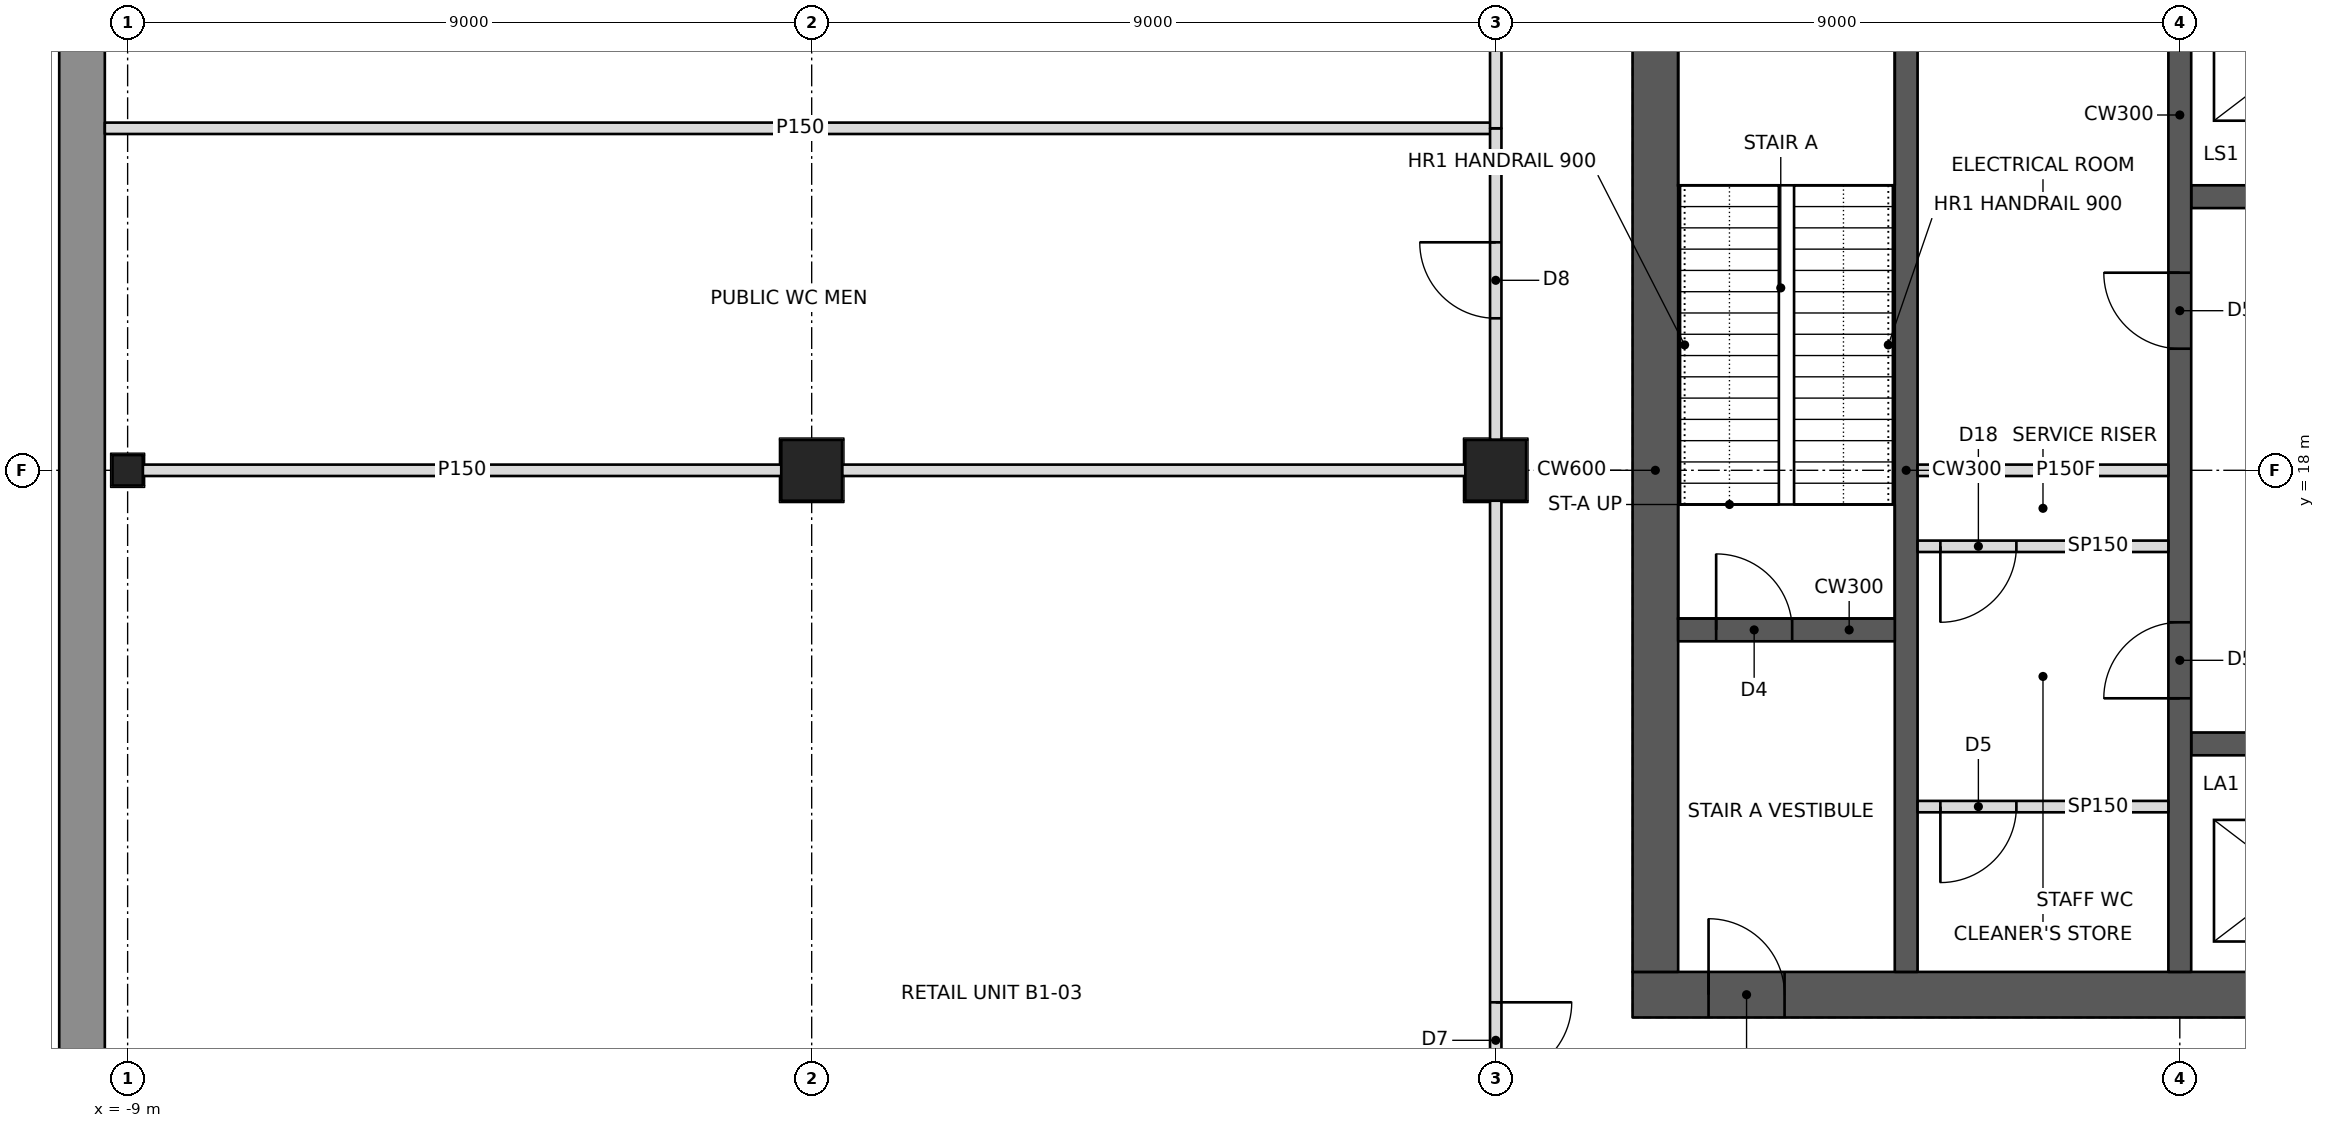
"""IFC4 building model, lengths in metres.
Left out: names, types, materials, properties, quantities, classifications, styles, units other than length and angle.
Written with IfcOpenShell. Run it as: python <this file> out.ifc"""

import sys

from ifc_helpers import new_model, si_unit, direction, frame, frame_2d, origin, origin_2d, place, context, subcontext, project, spatial, rectangle, hollow_rectangle, i_section, extrude, element, fill, save


model = new_model("IFC4")
c1 = context("Model", 3, precision=1e-05, world=origin(), true_north=direction((0.0, 1.0)))
c2 = subcontext(c1, "Body", "Model", "MODEL_VIEW")
j1 = project(units=[si_unit("LENGTHUNIT", "METRE"), si_unit("PLANEANGLEUNIT", "RADIAN")], contexts=[c1])
p1 = place(None, origin())
s1 = spatial("IfcSite", under=j1, at=p1, CompositionType="ELEMENT")
p2 = place(p1, origin())
s2 = spatial("IfcBuilding", under=s1, at=p2, CompositionType="ELEMENT")
p3 = place(p2, frame((0.0, 0.0, -5.5)))
s3 = spatial("IfcBuildingStorey", under=s2, at=p3, CompositionType="ELEMENT", Elevation=-5.5)
p4 = place(p3, frame((-9.0, 18.0, 0.0), z_axis=(0.0, 0.0, 1.0), x_axis=(0.0, 1.0, 0.0)))
e1 = element("IfcColumn", 1, at=p4, inside=s3, PredefinedType="COLUMN", context=c2, shape_type="SweptSolid", body=[
    extrude(i_section(OverallWidth=0.401, OverallDepth=0.399, WebThickness=0.025, FlangeThickness=0.04, at=origin_2d()), origin(), (0.0, 0.0, 1.0), 5.5),
])
for number, where, z_axis, x_axis in (
    (2, (0.0, 18.0, 0.0), (0.0, 0.0, 1.0), (0.0, 1.0, 0.0)),
    (3, (9.0, 18.0, 0.0), (0.0, 0.0, 1.0), (1.0, 0.0, 0.0)),
):
    element("IfcColumn", number, at=place(p3, frame(where, z_axis=z_axis, x_axis=x_axis)), inside=s3, PredefinedType="COLUMN", context=c2, shape_type="SweptSolid", body=[
        extrude(hollow_rectangle(XDim=0.8, YDim=0.8, WallThickness=0.1, at=origin_2d()), origin(), (0.0, 0.0, 1.0), 5.5),
    ])
p5 = place(p3, frame((10.8, 11.1, 0.0), z_axis=(0.0, 0.0, 1.0), x_axis=(1.0, 0.0, 0.0)))
e4 = element("IfcWall", 4, at=p5, inside=s3, PredefinedType="SHEAR", context=c2, shape_type="SweptSolid", body=[
    extrude(rectangle(XDim=23.4, YDim=0.6, at=frame_2d((11.7, 0.0))), origin(), (0.0, 0.0, 1.0), 5.5),
])
p6 = place(p5, frame((1.0, 0.0, 0.0)))
e5 = element("IfcOpeningElement", 5, at=p6, cuts=e4, PredefinedType="OPENING", context=c2, shape_type="SweptSolid", body=[
    extrude(rectangle(XDim=1.0, YDim=2.1, at=frame_2d((0.5, 1.05))), frame((0.0, 0.31, 0.0), z_axis=(0.0, -1.0, 0.0), x_axis=(1.0, 0.0, 0.0)), (0.0, 0.0, 1.0), 0.62),
])
p7 = place(p5, frame((17.2, 0.0, 0.0)))
e6 = element("IfcOpeningElement", 6, at=p7, cuts=e4, PredefinedType="OPENING", context=c2, shape_type="SweptSolid", body=[
    extrude(rectangle(XDim=1.8, YDim=2.1, at=frame_2d((0.9, 1.05))), frame((0.0, 0.31, 0.0), z_axis=(0.0, -1.0, 0.0), x_axis=(1.0, 0.0, 0.0)), (0.0, 0.0, 1.0), 0.62),
])
p8 = place(p3, frame((11.1, 11.4, 0.0), z_axis=(0.0, 0.0, 1.0), x_axis=(0.0, 1.0, 0.0)))
e7 = element("IfcWall", 7, at=p8, inside=s3, PredefinedType="SHEAR", context=c2, shape_type="SweptSolid", body=[
    extrude(rectangle(XDim=13.2, YDim=0.6, at=frame_2d((6.6, 0.0))), origin(), (0.0, 0.0, 1.0), 5.5),
])
p9 = place(p3, frame((14.4, 11.4, 0.0), z_axis=(0.0, 0.0, 1.0), x_axis=(0.0, 1.0, 0.0)))
e8 = element("IfcWall", 8, at=p9, inside=s3, PredefinedType="SHEAR", context=c2, shape_type="SweptSolid", body=[
    extrude(rectangle(XDim=13.2, YDim=0.3, at=frame_2d((6.6, 0.0))), origin(), (0.0, 0.0, 1.0), 5.5),
])
p10 = place(p3, frame((11.4, 15.9, 0.0), z_axis=(0.0, 0.0, 1.0), x_axis=(1.0, 0.0, 0.0)))
e9 = element("IfcWall", 9, at=p10, inside=s3, PredefinedType="SHEAR", context=c2, shape_type="SweptSolid", body=[
    extrude(rectangle(XDim=2.85, YDim=0.3, at=frame_2d((1.425, 0.0))), origin(), (0.0, 0.0, 1.0), 5.5),
])
p11 = place(p10, frame((0.5, 0.0, 0.0)))
e10 = element("IfcOpeningElement", 10, at=p11, cuts=e9, PredefinedType="OPENING", context=c2, shape_type="SweptSolid", body=[
    extrude(rectangle(XDim=1.0, YDim=2.1, at=frame_2d((0.5, 1.05))), frame((0.0, 0.16, 0.0), z_axis=(0.0, -1.0, 0.0), x_axis=(1.0, 0.0, 0.0)), (0.0, 0.0, 1.0), 0.32),
])
p12 = place(p3, frame((18.0, 11.4, 0.0), z_axis=(0.0, 0.0, 1.0), x_axis=(0.0, 1.0, 0.0)))
e11 = element("IfcWall", 11, at=p12, inside=s3, PredefinedType="SHEAR", context=c2, shape_type="SweptSolid", body=[
    extrude(rectangle(XDim=13.2, YDim=0.3, at=frame_2d((6.6, 0.0))), origin(), (0.0, 0.0, 1.0), 5.5),
])
p13 = place(p12, frame((3.6, 0.0, 0.0)))
e12 = element("IfcOpeningElement", 12, at=p13, cuts=e11, PredefinedType="OPENING", context=c2, shape_type="SweptSolid", body=[
    extrude(rectangle(XDim=1.0, YDim=2.1, at=frame_2d((0.5, 1.05))), frame((0.0, 0.16, 0.0), z_axis=(0.0, -1.0, 0.0), x_axis=(1.0, 0.0, 0.0)), (0.0, 0.0, 1.0), 0.32),
])
p14 = place(p12, frame((8.2, 0.0, 0.0)))
e13 = element("IfcOpeningElement", 13, at=p14, cuts=e11, PredefinedType="OPENING", context=c2, shape_type="SweptSolid", body=[
    extrude(rectangle(XDim=1.0, YDim=2.1, at=frame_2d((0.5, 1.05))), frame((0.0, 0.16, 0.0), z_axis=(0.0, -1.0, 0.0), x_axis=(1.0, 0.0, 0.0)), (0.0, 0.0, 1.0), 0.32),
])
p15 = place(p3, frame((14.55, 18.0, 0.0), z_axis=(0.0, 0.0, 1.0), x_axis=(1.0, 0.0, 0.0)))
e14 = element("IfcWall", 14, at=p15, inside=s3, PredefinedType="PARTITIONING", context=c2, shape_type="SweptSolid", body=[
    extrude(rectangle(XDim=3.3, YDim=0.15, at=frame_2d((1.65, 0.0))), origin(), (0.0, 0.0, 1.0), 5.2),
])
p16 = place(p3, frame((18.15, 14.4, 0.0), z_axis=(0.0, 0.0, 1.0), x_axis=(1.0, 0.0, 0.0)))
e15 = element("IfcWall", 15, at=p16, inside=s3, PredefinedType="SHEAR", context=c2, shape_type="SweptSolid", body=[
    extrude(rectangle(XDim=9.0, YDim=0.3, at=frame_2d((4.5, 0.0))), origin(), (0.0, 0.0, 1.0), 5.5),
])
p17 = place(p16, frame((6.75, 0.0, 0.0)))
e16 = element("IfcOpeningElement", 16, at=p17, cuts=e15, PredefinedType="OPENING", context=c2, shape_type="SweptSolid", body=[
    extrude(rectangle(XDim=1.2, YDim=2.1, at=frame_2d((0.6, 1.05))), frame((0.0, 0.16, 0.0), z_axis=(0.0, -1.0, 0.0), x_axis=(1.0, 0.0, 0.0)), (0.0, 0.0, 1.0), 0.32),
])
p18 = place(p3, frame((18.15, 21.6, 0.0), z_axis=(0.0, 0.0, 1.0), x_axis=(1.0, 0.0, 0.0)))
e17 = element("IfcWall", 17, at=p18, inside=s3, PredefinedType="SHEAR", context=c2, shape_type="SweptSolid", body=[
    extrude(rectangle(XDim=9.0, YDim=0.3, at=frame_2d((4.5, 0.0))), origin(), (0.0, 0.0, 1.0), 5.5),
])
p19 = place(p18, frame((6.75, 0.0, 0.0)))
e18 = element("IfcOpeningElement", 18, at=p19, cuts=e17, PredefinedType="OPENING", context=c2, shape_type="SweptSolid", body=[
    extrude(rectangle(XDim=1.2, YDim=2.1, at=frame_2d((0.6, 1.05))), frame((0.0, 0.16, 0.0), z_axis=(0.0, -1.0, 0.0), x_axis=(1.0, 0.0, 0.0)), (0.0, 0.0, 1.0), 0.32),
])
p20 = place(p3, frame((-9.6, 45.6, -0.3), z_axis=(0.0, 0.0, 1.0), x_axis=(0.0, -1.0, 0.0)))
e19 = element("IfcWall", 19, at=p20, inside=s3, PredefinedType="SOLIDWALL", context=c2, shape_type="SweptSolid", body=[
    extrude(rectangle(XDim=73.2, YDim=0.6, at=frame_2d((36.6, 0.0))), origin(), (0.0, 0.0, 1.0), 5.5),
])
p21 = place(p3, frame((-8.801, 18.0, 0.0), z_axis=(0.0, 0.0, 1.0), x_axis=(1.0, 0.0, 0.0)))
e20 = element("IfcWall", 20, at=p21, inside=s3, PredefinedType="PARTITIONING", context=c2, shape_type="SweptSolid", body=[
    extrude(rectangle(XDim=8.401, YDim=0.15, at=frame_2d((4.2, 0.0))), origin(), (0.0, 0.0, 1.0), 4.253),
])
p22 = place(p3, frame((0.4, 18.0, 0.0), z_axis=(0.0, 0.0, 1.0), x_axis=(1.0, 0.0, 0.0)))
e21 = element("IfcWall", 21, at=p22, inside=s3, PredefinedType="PARTITIONING", context=c2, shape_type="SweptSolid", body=[
    extrude(rectangle(XDim=8.2, YDim=0.15, at=frame_2d((4.1, 0.0))), origin(), (0.0, 0.0, 1.0), 4.253),
])
p23 = place(p3, frame((-9.3, 22.5, 0.0), z_axis=(0.0, 0.0, 1.0), x_axis=(1.0, 0.0, 0.0)))
e22 = element("IfcWall", 22, at=p23, inside=s3, PredefinedType="PARTITIONING", context=c2, shape_type="SweptSolid", body=[
    extrude(rectangle(XDim=18.3, YDim=0.15, at=frame_2d((9.15, 0.0))), origin(), (0.0, 0.0, 1.0), 4.252),
])
p24 = place(p3, frame((9.0, 17.6, 0.0), z_axis=(0.0, 0.0, 1.0), x_axis=(0.0, -1.0, 0.0)))
e23 = element("IfcWall", 23, at=p24, inside=s3, PredefinedType="PARTITIONING", context=c2, shape_type="SweptSolid", body=[
    extrude(rectangle(XDim=8.2, YDim=0.15, at=frame_2d((4.1, 0.0))), origin(), (0.0, 0.0, 1.0), 4.253),
])
p25 = place(p24, frame((6.6, 0.0, 0.0)))
e24 = element("IfcOpeningElement", 24, at=p25, cuts=e23, PredefinedType="OPENING", context=c2, shape_type="SweptSolid", body=[
    extrude(rectangle(XDim=1.0, YDim=2.1, at=frame_2d((0.5, 1.05))), frame((0.0, 0.085, 0.0), z_axis=(0.0, -1.0, 0.0), x_axis=(1.0, 0.0, 0.0)), (0.0, 0.0, 1.0), 0.17),
])
p26 = place(p3, frame((9.0, 22.5, 0.0), z_axis=(0.0, 0.0, 1.0), x_axis=(0.0, -1.0, 0.0)))
e25 = element("IfcWall", 25, at=p26, inside=s3, PredefinedType="PARTITIONING", context=c2, shape_type="SweptSolid", body=[
    extrude(rectangle(XDim=4.1, YDim=0.15, at=frame_2d((2.05, 0.0))), origin(), (0.0, 0.0, 1.0), 4.253),
])
p27 = place(p26, frame((1.5, 0.0, 0.0)))
e26 = element("IfcOpeningElement", 26, at=p27, cuts=e25, PredefinedType="OPENING", context=c2, shape_type="SweptSolid", body=[
    extrude(rectangle(XDim=1.0, YDim=2.1, at=frame_2d((0.5, 1.05))), frame((0.0, 0.085, 0.0), z_axis=(0.0, -1.0, 0.0), x_axis=(1.0, 0.0, 0.0)), (0.0, 0.0, 1.0), 0.17),
])
p28 = place(p3, frame((9.0, 26.6, 0.0), z_axis=(0.0, 0.0, 1.0), x_axis=(0.0, -1.0, 0.0)))
e27 = element("IfcWall", 27, at=p28, inside=s3, PredefinedType="PARTITIONING", context=c2, shape_type="SweptSolid", body=[
    extrude(rectangle(XDim=4.1, YDim=0.15, at=frame_2d((2.05, 0.0))), origin(), (0.0, 0.0, 1.0), 4.253),
])
p29 = place(p28, frame((1.1, 0.0, 0.0)))
e28 = element("IfcOpeningElement", 28, at=p29, cuts=e27, PredefinedType="OPENING", context=c2, shape_type="SweptSolid", body=[
    extrude(rectangle(XDim=1.0, YDim=2.1, at=frame_2d((0.5, 1.05))), frame((0.0, 0.085, 0.0), z_axis=(0.0, -1.0, 0.0), x_axis=(1.0, 0.0, 0.0)), (0.0, 0.0, 1.0), 0.17),
])
p30 = place(p3, frame((14.55, 17.0, 0.0), z_axis=(0.0, 0.0, 1.0), x_axis=(1.0, 0.0, 0.0)))
e29 = element("IfcWall", 29, at=p30, inside=s3, PredefinedType="PARTITIONING", context=c2, shape_type="SweptSolid", body=[
    extrude(rectangle(XDim=3.3, YDim=0.15, at=frame_2d((1.65, 0.0))), origin(), (0.0, 0.0, 1.0), 5.2),
])
p31 = place(p30, frame((0.3, 0.0, 0.0)))
e30 = element("IfcOpeningElement", 30, at=p31, cuts=e29, PredefinedType="OPENING", context=c2, shape_type="SweptSolid", body=[
    extrude(rectangle(XDim=1.0, YDim=2.1, at=frame_2d((0.5, 1.05))), frame((0.0, 0.085, 0.0), z_axis=(0.0, -1.0, 0.0), x_axis=(1.0, 0.0, 0.0)), (0.0, 0.0, 1.0), 0.17),
])
p32 = place(p3, frame((14.55, 13.575, 0.0), z_axis=(0.0, 0.0, 1.0), x_axis=(1.0, 0.0, 0.0)))
e31 = element("IfcWall", 31, at=p32, inside=s3, PredefinedType="PARTITIONING", context=c2, shape_type="SweptSolid", body=[
    extrude(rectangle(XDim=3.3, YDim=0.15, at=frame_2d((1.65, 0.0))), origin(), (0.0, 0.0, 1.0), 5.2),
])
p33 = place(p32, frame((0.3, 0.0, 0.0)))
e32 = element("IfcOpeningElement", 32, at=p33, cuts=e31, PredefinedType="OPENING", context=c2, shape_type="SweptSolid", body=[
    extrude(rectangle(XDim=1.0, YDim=2.1, at=frame_2d((0.5, 1.05))), frame((0.0, 0.085, 0.0), z_axis=(0.0, -1.0, 0.0), x_axis=(1.0, 0.0, 0.0)), (0.0, 0.0, 1.0), 0.17),
])
p34 = place(p25, origin())
e33 = element("IfcDoor", 33, at=p34, inside=s3, OperationType="SINGLE_SWING_LEFT", PredefinedType="DOOR", context=c2, shape_type="SweptSolid", body=[
    extrude(rectangle(XDim=1.0, YDim=2.1, at=frame_2d((0.5, 1.05))), frame((0.0, 0.025, 0.0), z_axis=(0.0, -1.0, 0.0), x_axis=(1.0, 0.0, 0.0)), (0.0, 0.0, 1.0), 0.05),
])
fill(e24, e33)
p35 = place(p27, frame((1.0, 0.0, 0.0), z_axis=(0.0, 0.0, 1.0), x_axis=(-1.0, 0.0, 0.0)))
e34 = element("IfcDoor", 34, at=p35, inside=s3, OperationType="SINGLE_SWING_RIGHT", PredefinedType="DOOR", context=c2, shape_type="SweptSolid", body=[
    extrude(rectangle(XDim=1.0, YDim=2.1, at=frame_2d((0.5, 1.05))), frame((0.0, 0.025, 0.0), z_axis=(0.0, -1.0, 0.0), x_axis=(1.0, 0.0, 0.0)), (0.0, 0.0, 1.0), 0.05),
])
fill(e26, e34)
p36 = place(p31, frame((1.0, 0.0, 0.0), z_axis=(0.0, 0.0, 1.0), x_axis=(-1.0, 0.0, 0.0)))
e35 = element("IfcDoor", 35, at=p36, inside=s3, OperationType="SINGLE_SWING_RIGHT", PredefinedType="DOOR", context=c2, shape_type="SweptSolid", body=[
    extrude(rectangle(XDim=1.0, YDim=2.1, at=frame_2d((0.5, 1.05))), frame((0.0, 0.025, 0.0), z_axis=(0.0, -1.0, 0.0), x_axis=(1.0, 0.0, 0.0)), (0.0, 0.0, 1.0), 0.05),
])
fill(e30, e35)
p37 = place(p33, frame((1.0, 0.0, 0.0), z_axis=(0.0, 0.0, 1.0), x_axis=(-1.0, 0.0, 0.0)))
e36 = element("IfcDoor", 36, at=p37, inside=s3, OperationType="SINGLE_SWING_RIGHT", PredefinedType="DOOR", context=c2, shape_type="SweptSolid", body=[
    extrude(rectangle(XDim=1.0, YDim=2.1, at=frame_2d((0.5, 1.05))), frame((0.0, 0.025, 0.0), z_axis=(0.0, -1.0, 0.0), x_axis=(1.0, 0.0, 0.0)), (0.0, 0.0, 1.0), 0.05),
])
fill(e32, e36)
p38 = place(p6, origin())
e37 = element("IfcDoor", 37, at=p38, inside=s3, OperationType="SINGLE_SWING_LEFT", PredefinedType="DOOR", context=c2, shape_type="SweptSolid", body=[
    extrude(rectangle(XDim=1.0, YDim=2.1, at=frame_2d((0.5, 1.05))), frame((0.0, 0.025, 0.0), z_axis=(0.0, -1.0, 0.0), x_axis=(1.0, 0.0, 0.0)), (0.0, 0.0, 1.0), 0.05),
])
fill(e5, e37)
p39 = place(p11, origin())
e38 = element("IfcDoor", 38, at=p39, inside=s3, OperationType="SINGLE_SWING_LEFT", PredefinedType="DOOR", context=c2, shape_type="SweptSolid", body=[
    extrude(rectangle(XDim=1.0, YDim=2.1, at=frame_2d((0.5, 1.05))), frame((0.0, 0.025, 0.0), z_axis=(0.0, -1.0, 0.0), x_axis=(1.0, 0.0, 0.0)), (0.0, 0.0, 1.0), 0.05),
])
fill(e10, e38)
p40 = place(p13, origin())
e39 = element("IfcDoor", 39, at=p40, inside=s3, OperationType="SINGLE_SWING_LEFT", PredefinedType="DOOR", context=c2, shape_type="SweptSolid", body=[
    extrude(rectangle(XDim=1.0, YDim=2.1, at=frame_2d((0.5, 1.05))), frame((0.0, 0.025, 0.0), z_axis=(0.0, -1.0, 0.0), x_axis=(1.0, 0.0, 0.0)), (0.0, 0.0, 1.0), 0.05),
])
fill(e12, e39)
p41 = place(p14, origin())
e40 = element("IfcDoor", 40, at=p41, inside=s3, OperationType="SINGLE_SWING_RIGHT", PredefinedType="DOOR", context=c2, shape_type="SweptSolid", body=[
    extrude(rectangle(XDim=1.0, YDim=2.1, at=frame_2d((0.5, 1.05))), frame((0.0, 0.025, 0.0), z_axis=(0.0, -1.0, 0.0), x_axis=(1.0, 0.0, 0.0)), (0.0, 0.0, 1.0), 0.05),
])
fill(e13, e40)
save(model, sys.argv[1])
